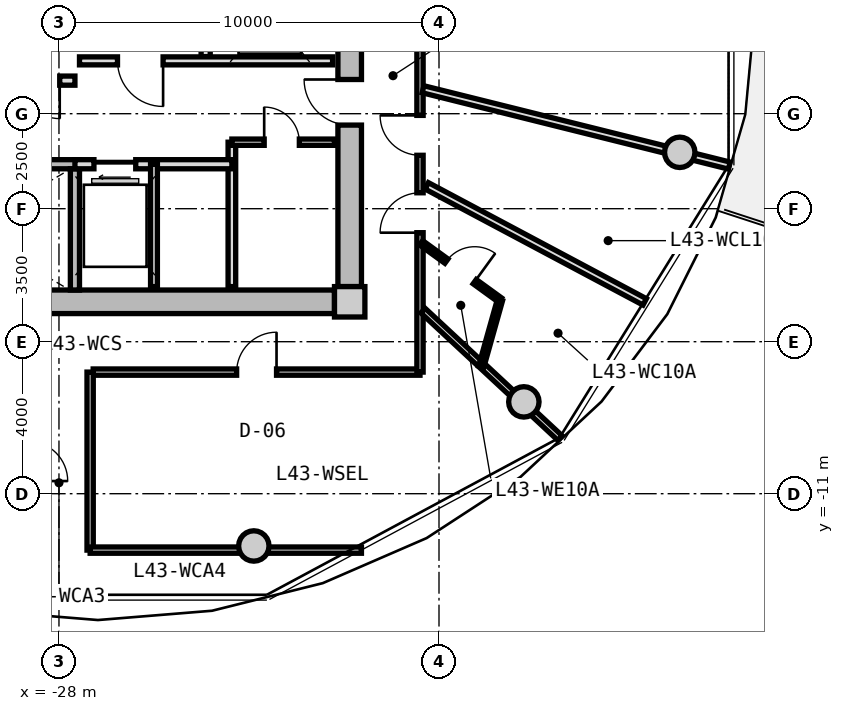
"""IFC4 building model, lengths in metres.
Left out: names, types, materials, properties, quantities, classifications, styles, units other than length and angle.
Written with IfcOpenShell. Run it as: python <this file> out.ifc"""

import sys

from ifc_helpers import new_model, si_unit, direction, frame, frame_2d, origin, origin_2d, place, context, subcontext, project, spatial, rectangle, circle, extrude, source, transform, mapped, element, fill, save


model = new_model("IFC4")
c1 = context("Model", 3, precision=1e-05, world=origin(), true_north=direction((0.0, 1.0)))
c2 = subcontext(c1, "Body", "Model", "MODEL_VIEW")
j1 = project(units=[si_unit("LENGTHUNIT", "METRE"), si_unit("PLANEANGLEUNIT", "RADIAN")], contexts=[c1])
p1 = place(None, origin())
s1 = spatial("IfcSite", under=j1, at=p1, CompositionType="ELEMENT")
p2 = place(p1, origin())
s2 = spatial("IfcBuilding", under=s1, at=p2, CompositionType="ELEMENT")
p3 = place(p2, frame((0.0, 0.0, 140.4)))
s3 = spatial("IfcBuildingStorey", under=s2, at=p3, CompositionType="ELEMENT", Elevation=140.4)
m1 = source(origin(), c2, "Body", "SweptSolid", [
    extrude(rectangle(XDim=0.8, YDim=0.8, at=origin_2d()), origin(), (0.0, 0.0, 1.0), 3.05),
])
p4 = place(p3, frame((-20.35, -5.95, 0.0), z_axis=(0.0, 0.0, 1.0), x_axis=(1.0, 0.0, 0.0)))
e1 = element("IfcColumn", 1, at=p4, inside=s3, PredefinedType="COLUMN", context=c2, shape_type="MappedRepresentation", body=[
    mapped(m1, transform((0.0, 0.0, 0.0), x_axis=(1.0, 0.0, 0.0), y_axis=(0.0, 1.0, 0.0), z_axis=(0.0, 0.0, 1.0), scale=1.0)),
])
m2 = source(origin(), c2, "Body", "SweptSolid", [
    extrude(rectangle(XDim=14.5, YDim=0.62, at=frame_2d((7.25, 0.0))), origin(), (0.0, 0.0, 1.0), 2.81),
])
p5 = place(p3, frame((-20.75, -5.95, 0.0), z_axis=(0.0, 0.0, 1.0), x_axis=(-1.0, 0.0, 0.0)))
e2 = element("IfcWall", 2, at=p5, inside=s3, PredefinedType="SHEAR", context=c2, shape_type="MappedRepresentation", body=[
    mapped(m2, transform((0.0, 0.0, 0.0), x_axis=(1.0, 0.0, 0.0), y_axis=(0.0, 1.0, 0.0), z_axis=(0.0, 0.0, 1.0), scale=1.0)),
])
m3 = source(origin(), c2, "Body", "SweptSolid", [
    extrude(rectangle(XDim=11.1, YDim=0.62, at=frame_2d((5.55, 0.0))), origin(), (0.0, 0.0, 1.0), 2.81),
])
p6 = place(p3, frame((-20.35, 5.55, 0.0), z_axis=(0.0, 0.0, 1.0), x_axis=(0.0, -1.0, 0.0)))
e3 = element("IfcWall", 3, at=p6, inside=s3, PredefinedType="SHEAR", context=c2, shape_type="MappedRepresentation", body=[
    mapped(m3, transform((0.0, 0.0, 0.0), x_axis=(1.0, 0.0, 0.0), y_axis=(0.0, 1.0, 0.0), z_axis=(0.0, 0.0, 1.0), scale=1.0)),
])
p7 = place(p6, frame((5.65, 0.0, 0.0)))
e4 = element("IfcOpeningElement", 4, at=p7, cuts=e3, PredefinedType="OPENING", context=c2, shape_type="SweptSolid", body=[
    extrude(rectangle(XDim=1.2, YDim=2.15, at=frame_2d((0.6, 1.075))), frame((0.0, 0.32, 0.0), z_axis=(0.0, -1.0, 0.0), x_axis=(1.0, 0.0, 0.0)), (0.0, 0.0, 1.0), 0.64),
])
m4 = source(origin(), c2, "Body", "SweptSolid", [
    extrude(circle(Radius=0.4, at=origin_2d()), origin(), (0.0, 0.0, 1.0), 3.05),
])
for number, where, z_axis, x_axis in (
    (5, (-22.873, -12.375, 0.0), (0.0, 0.0, 1.0), (1.0, 0.0, 0.0)),
    (6, (-15.767, -8.584, 0.0), (0.0, 0.0, 1.0), (1.0, 0.0, 0.0)),
    (7, (-11.665, -2.016, 0.0), (0.0, 0.0, 1.0), (1.0, 0.0, 0.0)),
):
    element("IfcColumn", number, at=place(p3, frame(where, z_axis=z_axis, x_axis=x_axis)), inside=s3, PredefinedType="COLUMN", context=c2, shape_type="MappedRepresentation", body=[
        mapped(m4, transform((0.0, 0.0, 0.0), x_axis=(1.0, 0.0, 0.0), y_axis=(0.0, 1.0, 0.0), z_axis=(0.0, 0.0, 1.0), scale=1.0)),
    ])
m5 = source(origin(), c2, "Body", "SweptSolid", [
    extrude(rectangle(XDim=7.88, YDim=0.24, at=frame_2d((3.94, 0.0))), origin(), (0.0, 0.0, 1.0), 2.81),
])
p8 = place(p3, frame((-35.34, -2.33, 0.0), z_axis=(0.0, 0.0, 1.0), x_axis=(1.0, 0.0, 0.0)))
e8 = element("IfcWall", 8, at=p8, inside=s3, PredefinedType="PARTITIONING", context=c2, shape_type="MappedRepresentation", body=[
    mapped(m5, transform((0.0, 0.0, 0.0), x_axis=(1.0, 0.0, 0.0), y_axis=(0.0, 1.0, 0.0), z_axis=(0.0, 0.0, 1.0), scale=1.0)),
])
p9 = place(p8, frame((1.0, 0.0, 0.0)))
e9 = element("IfcOpeningElement", 9, at=p9, cuts=e8, PredefinedType="OPENING", context=c2, shape_type="SweptSolid", body=[
    extrude(rectangle(XDim=1.1, YDim=2.15, at=frame_2d((0.55, 1.075))), frame((0.0, 0.13, 0.0), z_axis=(0.0, -1.0, 0.0), x_axis=(1.0, 0.0, 0.0)), (0.0, 0.0, 1.0), 0.26),
])
m6 = source(origin(), c2, "Body", "SweptSolid", [
    extrude(rectangle(XDim=3.19, YDim=0.24, at=frame_2d((1.595, 0.0))), origin(), (0.0, 0.0, 1.0), 2.81),
])
p10 = place(p3, frame((-27.58, -5.64, 0.0), z_axis=(0.0, 0.0, 1.0), x_axis=(0.0, 1.0, 0.0)))
e10 = element("IfcWall", 10, at=p10, inside=s3, PredefinedType="PARTITIONING", context=c2, shape_type="MappedRepresentation", body=[
    mapped(m6, transform((0.0, 0.0, 0.0), x_axis=(1.0, 0.0, 0.0), y_axis=(0.0, 1.0, 0.0), z_axis=(0.0, 0.0, 1.0), scale=1.0)),
])
m7 = source(origin(), c2, "Body", "SweptSolid", [
    extrude(rectangle(XDim=5.0, YDim=0.24, at=frame_2d((2.5, 0.0))), origin(), (0.0, 0.0, 1.0), 2.795),
])
p11 = place(p3, frame((-24.14, 0.5, 0.0), z_axis=(0.0, 0.0, 1.0), x_axis=(0.0, 1.0, 0.0)))
e11 = element("IfcWall", 11, at=p11, inside=s3, PredefinedType="PARTITIONING", context=c2, shape_type="MappedRepresentation", body=[
    mapped(m7, transform((0.0, 0.0, 0.0), x_axis=(1.0, 0.0, 0.0), y_axis=(0.0, 1.0, 0.0), z_axis=(0.0, 0.0, 1.0), scale=1.0)),
])
p12 = place(p11, frame((3.05, 0.0, 0.0)))
e12 = element("IfcOpeningElement", 12, at=p12, cuts=e11, PredefinedType="OPENING", context=c2, shape_type="SweptSolid", body=[
    extrude(rectangle(XDim=1.3, YDim=2.2, at=frame_2d((0.65, 1.1))), frame((0.0, 0.13, 0.0), z_axis=(0.0, -1.0, 0.0), x_axis=(1.0, 0.0, 0.0)), (0.0, 0.0, 1.0), 0.26),
])
p13 = place(p11, frame((0.55, 0.0, 0.0)))
e13 = element("IfcOpeningElement", 13, at=p13, cuts=e11, PredefinedType="OPENING", context=c2, shape_type="SweptSolid", body=[
    extrude(rectangle(XDim=1.3, YDim=2.2, at=frame_2d((0.65, 1.1))), frame((0.0, 0.13, 0.0), z_axis=(0.0, -1.0, 0.0), x_axis=(1.0, 0.0, 0.0)), (0.0, 0.0, 1.0), 0.26),
])
m8 = source(origin(), c2, "Body", "SweptSolid", [
    extrude(rectangle(XDim=6.66, YDim=0.21, at=frame_2d((3.33, 0.0))), origin(), (0.0, 0.0, 1.0), 2.795),
])
p14 = place(p3, frame((-27.46, 0.39, 0.0), z_axis=(0.0, 0.0, 1.0), x_axis=(1.0, 0.0, 0.0)))
e14 = element("IfcWall", 14, at=p14, inside=s3, PredefinedType="PARTITIONING", context=c2, shape_type="MappedRepresentation", body=[
    mapped(m8, transform((0.0, 0.0, 0.0), x_axis=(1.0, 0.0, 0.0), y_axis=(0.0, 1.0, 0.0), z_axis=(0.0, 0.0, 1.0), scale=1.0)),
])
p15 = place(p14, frame((1.0, 0.0, 0.0)))
e15 = element("IfcOpeningElement", 15, at=p15, cuts=e14, PredefinedType="OPENING", context=c2, shape_type="SweptSolid", body=[
    extrude(rectangle(XDim=1.2, YDim=2.15, at=frame_2d((0.6, 1.075))), frame((0.0, 0.115, 0.0), z_axis=(0.0, -1.0, 0.0), x_axis=(1.0, 0.0, 0.0)), (0.0, 0.0, 1.0), 0.23),
])
m9 = source(origin(), c2, "Body", "SweptSolid", [
    extrude(rectangle(XDim=7.62, YDim=0.24, at=frame_2d((3.81, 0.0))), origin(), (0.0, 0.0, 1.0), 2.795),
])
p16 = place(p3, frame((-35.2, -0.13, 0.0), z_axis=(0.0, 0.0, 1.0), x_axis=(1.0, 0.0, 0.0)))
e16 = element("IfcWall", 16, at=p16, inside=s3, PredefinedType="PARTITIONING", context=c2, shape_type="MappedRepresentation", body=[
    mapped(m9, transform((0.0, 0.0, 0.0), x_axis=(1.0, 0.0, 0.0), y_axis=(0.0, 1.0, 0.0), z_axis=(0.0, 0.0, 1.0), scale=1.0)),
])
p17 = place(p16, frame((6.22, 0.0, 0.0)))
e17 = element("IfcOpeningElement", 17, at=p17, cuts=e16, PredefinedType="OPENING", context=c2, shape_type="SweptSolid", body=[
    extrude(rectangle(XDim=1.0, YDim=2.1, at=frame_2d((0.5, 1.05))), frame((0.0, 0.13, 0.0), z_axis=(0.0, -1.0, 0.0), x_axis=(1.0, 0.0, 0.0)), (0.0, 0.0, 1.0), 0.26),
])
p18 = place(p16, frame((2.4, 0.0, 0.0)))
e18 = element("IfcOpeningElement", 18, at=p18, cuts=e16, PredefinedType="OPENING", context=c2, shape_type="SweptSolid", body=[
    extrude(rectangle(XDim=1.0, YDim=2.1, at=frame_2d((0.5, 1.05))), frame((0.0, 0.13, 0.0), z_axis=(0.0, -1.0, 0.0), x_axis=(1.0, 0.0, 0.0)), (0.0, 0.0, 1.0), 0.26),
])
m10 = source(origin(), c2, "Body", "SweptSolid", [
    extrude(rectangle(XDim=3.8, YDim=0.2, at=frame_2d((1.9, 0.0))), origin(), (0.0, 0.0, 1.0), 2.795),
])
p19 = place(p3, frame((-23.45, -5.55, 0.0), z_axis=(0.0, 0.0, 1.0), x_axis=(0.0, 1.0, 0.0)))
e19 = element("IfcWall", 19, at=p19, inside=s3, PredefinedType="PARTITIONING", context=c2, shape_type="MappedRepresentation", body=[
    mapped(m10, transform((0.0, 0.0, 0.0), x_axis=(1.0, 0.0, 0.0), y_axis=(0.0, 1.0, 0.0), z_axis=(0.0, 0.0, 1.0), scale=1.0)),
])
m11 = source(origin(), c2, "Body", "SweptSolid", [
    extrude(rectangle(XDim=4.13, YDim=0.24, at=frame_2d((2.065, 0.0))), origin(), (0.0, 0.0, 1.0), 2.795),
])
p20 = place(p3, frame((-27.58, -2.33, 0.0), z_axis=(0.0, 0.0, 1.0), x_axis=(1.0, 0.0, 0.0)))
e20 = element("IfcWall", 20, at=p20, inside=s3, PredefinedType="PARTITIONING", context=c2, shape_type="MappedRepresentation", body=[
    mapped(m11, transform((0.0, 0.0, 0.0), x_axis=(1.0, 0.0, 0.0), y_axis=(0.0, 1.0, 0.0), z_axis=(0.0, 0.0, 1.0), scale=1.0)),
])
p21 = place(p20, frame((0.5, 0.0, 0.0)))
e21 = element("IfcOpeningElement", 21, at=p21, cuts=e20, PredefinedType="OPENING", context=c2, shape_type="SweptSolid", body=[
    extrude(rectangle(XDim=1.1, YDim=2.2, at=frame_2d((0.55, 1.1))), frame((0.0, 0.13, 0.0), z_axis=(0.0, -1.0, 0.0), x_axis=(1.0, 0.0, 0.0)), (0.0, 0.0, 1.0), 0.26),
])
m12 = source(origin(), c2, "Body", "SweptSolid", [
    extrude(rectangle(XDim=3.22, YDim=0.18, at=frame_2d((1.61, 0.0))), origin(), (0.0, 0.0, 1.0), 2.795),
])
p22 = place(p3, frame((-25.5, -5.55, 0.0), z_axis=(0.0, 0.0, 1.0), x_axis=(0.0, 1.0, 0.0)))
e22 = element("IfcWall", 22, at=p22, inside=s3, PredefinedType="PARTITIONING", context=c2, shape_type="MappedRepresentation", body=[
    mapped(m12, transform((0.0, 0.0, 0.0), x_axis=(1.0, 0.0, 0.0), y_axis=(0.0, 1.0, 0.0), z_axis=(0.0, 0.0, 1.0), scale=1.0)),
])
m13 = source(origin(), c2, "Body", "SweptSolid", [
    extrude(rectangle(XDim=2.7, YDim=0.165, at=frame_2d((1.35, 0.0))), origin(), (0.0, 0.0, 1.0), 2.795),
])
p23 = place(p3, frame((-23.45, -1.75, 0.0), z_axis=(0.0, 0.0, 1.0), x_axis=(1.0, 0.0, 0.0)))
e23 = element("IfcWall", 23, at=p23, inside=s3, PredefinedType="PARTITIONING", context=c2, shape_type="MappedRepresentation", body=[
    mapped(m13, transform((0.0, 0.0, 0.0), x_axis=(1.0, 0.0, 0.0), y_axis=(0.0, 1.0, 0.0), z_axis=(0.0, 0.0, 1.0), scale=1.0)),
])
p24 = place(p23, frame((0.85, 0.0, 0.0)))
e24 = element("IfcOpeningElement", 24, at=p24, cuts=e23, PredefinedType="OPENING", context=c2, shape_type="SweptSolid", body=[
    extrude(rectangle(XDim=0.925, YDim=2.1, at=frame_2d((0.462, 1.05))), frame((0.0, 0.093, 0.0), z_axis=(0.0, -1.0, 0.0), x_axis=(1.0, 0.0, 0.0)), (0.0, 0.0, 1.0), 0.185),
])
m14 = source(origin(), c2, "Body", "SweptSolid", [
    extrude(rectangle(XDim=8.6, YDim=0.165, at=frame_2d((4.3, 0.0))), origin(), (0.0, 0.0, 1.0), 2.795),
])
p25 = place(p3, frame((-18.5, -7.8, 0.0), z_axis=(0.0, 0.0, 1.0), x_axis=(-1.0, 0.0, 0.0)))
e25 = element("IfcWall", 25, at=p25, inside=s3, PredefinedType="PARTITIONING", context=c2, shape_type="MappedRepresentation", body=[
    mapped(m14, transform((0.0, 0.0, 0.0), x_axis=(1.0, 0.0, 0.0), y_axis=(0.0, 1.0, 0.0), z_axis=(0.0, 0.0, 1.0), scale=1.0)),
])
p26 = place(p25, frame((3.775, 0.0, 0.0)))
e26 = element("IfcOpeningElement", 26, at=p26, cuts=e25, PredefinedType="OPENING", context=c2, shape_type="SweptSolid", body=[
    extrude(rectangle(XDim=1.05, YDim=2.15, at=frame_2d((0.525, 1.075))), frame((0.0, 0.093, 0.0), z_axis=(0.0, -1.0, 0.0), x_axis=(1.0, 0.0, 0.0)), (0.0, 0.0, 1.0), 0.185),
])
m15 = source(origin(), c2, "Body", "SweptSolid", [
    extrude(rectangle(XDim=15.6, YDim=0.165, at=frame_2d((7.8, 0.0))), origin(), (0.0, 0.0, 1.0), 2.795),
])
p27 = place(p3, frame((-18.5, 7.8, 0.0), z_axis=(0.0, 0.0, 1.0), x_axis=(0.0, -1.0, 0.0)))
e27 = element("IfcWall", 27, at=p27, inside=s3, PredefinedType="PARTITIONING", context=c2, shape_type="MappedRepresentation", body=[
    mapped(m15, transform((0.0, 0.0, 0.0), x_axis=(1.0, 0.0, 0.0), y_axis=(0.0, 1.0, 0.0), z_axis=(0.0, 0.0, 1.0), scale=1.0)),
])
p28 = place(p27, frame((10.881, 0.0, 0.0)))
e28 = element("IfcOpeningElement", 28, at=p28, cuts=e27, PredefinedType="OPENING", context=c2, shape_type="SweptSolid", body=[
    extrude(rectangle(XDim=1.05, YDim=2.15, at=frame_2d((0.525, 1.075))), frame((0.0, 0.093, 0.0), z_axis=(0.0, -1.0, 0.0), x_axis=(1.0, 0.0, 0.0)), (0.0, 0.0, 1.0), 0.185),
])
p29 = place(p27, frame((8.844, 0.0, 0.0)))
e29 = element("IfcOpeningElement", 29, at=p29, cuts=e27, PredefinedType="OPENING", context=c2, shape_type="SweptSolid", body=[
    extrude(rectangle(XDim=1.05, YDim=2.15, at=frame_2d((0.525, 1.075))), frame((0.0, 0.093, 0.0), z_axis=(0.0, -1.0, 0.0), x_axis=(1.0, 0.0, 0.0)), (0.0, 0.0, 1.0), 0.185),
])
p30 = place(p27, frame((3.596, 0.0, 0.0)))
e30 = element("IfcOpeningElement", 30, at=p30, cuts=e27, PredefinedType="OPENING", context=c2, shape_type="SweptSolid", body=[
    extrude(rectangle(XDim=1.25, YDim=2.2, at=frame_2d((0.625, 1.1))), frame((0.0, 0.093, 0.0), z_axis=(0.0, -1.0, 0.0), x_axis=(1.0, 0.0, 0.0)), (0.0, 0.0, 1.0), 0.185),
])
m16 = source(origin(), c2, "Body", "SweptSolid", [
    extrude(rectangle(XDim=4.927, YDim=0.165, at=frame_2d((2.463, 0.0))), origin(), (0.0, 0.0, 1.0), 2.345),
])
p31 = place(p3, frame((-18.42, -6.183, 0.0), z_axis=(0.0, 0.0, 1.0), x_axis=(0.732191335987, -0.681098999783, 0.0)))
e31 = element("IfcWall", 31, at=p31, inside=s3, PredefinedType="PARTITIONING", context=c2, shape_type="MappedRepresentation", body=[
    mapped(m16, transform((0.0, 0.0, 0.0), x_axis=(1.0, 0.0, 0.0), y_axis=(0.0, 1.0, 0.0), z_axis=(0.0, 0.0, 1.0), scale=1.0)),
])
m17 = source(origin(), c2, "Body", "SweptSolid", [
    extrude(rectangle(XDim=4.685, YDim=0.165, at=frame_2d((2.342, 0.0))), origin(), (0.0, 0.0, 1.0), 2.795),
])
p32 = place(p3, frame((-27.18, -12.485, 0.0), z_axis=(0.0, 0.0, 1.0), x_axis=(0.0, 1.0, 0.0)))
e32 = element("IfcWall", 32, at=p32, inside=s3, PredefinedType="PARTITIONING", context=c2, shape_type="MappedRepresentation", body=[
    mapped(m17, transform((0.0, 0.0, 0.0), x_axis=(1.0, 0.0, 0.0), y_axis=(0.0, 1.0, 0.0), z_axis=(0.0, 0.0, 1.0), scale=1.0)),
])
m18 = source(origin(), c2, "Body", "SweptSolid", [
    extrude(rectangle(XDim=7.139, YDim=0.165, at=frame_2d((3.569, 0.0))), origin(), (0.0, 0.0, 1.0), 2.345),
])
p33 = place(p3, frame((-27.18, -12.485, 0.0), z_axis=(0.0, 0.0, 1.0), x_axis=(1.0, 0.0, 0.0)))
e33 = element("IfcWall", 33, at=p33, inside=s3, PredefinedType="PARTITIONING", context=c2, shape_type="MappedRepresentation", body=[
    mapped(m18, transform((0.0, 0.0, 0.0), x_axis=(1.0, 0.0, 0.0), y_axis=(0.0, 1.0, 0.0), z_axis=(0.0, 0.0, 1.0), scale=1.0)),
])
m19 = source(origin(), c2, "Body", "SweptSolid", [
    extrude(rectangle(XDim=8.305, YDim=0.19, at=frame_2d((4.153, 0.0))), origin(), (0.0, 0.0, 1.0), 2.345),
])
p34 = place(p3, frame((-18.42, -0.357, 0.0), z_axis=(0.0, 0.0, 1.0), x_axis=(0.970309994378, -0.241864662175, 0.0)))
e34 = element("IfcWall", 34, at=p34, inside=s3, PredefinedType="PARTITIONING", context=c2, shape_type="MappedRepresentation", body=[
    mapped(m19, transform((0.0, 0.0, 0.0), x_axis=(1.0, 0.0, 0.0), y_axis=(0.0, 1.0, 0.0), z_axis=(0.0, 0.0, 1.0), scale=1.0)),
])
m20 = source(origin(), c2, "Body", "SweptSolid", [
    extrude(rectangle(XDim=6.499, YDim=0.19, at=frame_2d((3.25, 0.0))), origin(), (0.0, 0.0, 1.0), 2.795),
])
p35 = place(p3, frame((-18.324, -2.898, 0.0), z_axis=(0.0, 0.0, 1.0), x_axis=(0.882700013711, -0.469936895545, 0.0)))
e35 = element("IfcWall", 35, at=p35, inside=s3, PredefinedType="PARTITIONING", context=c2, shape_type="MappedRepresentation", body=[
    mapped(m20, transform((0.0, 0.0, 0.0), x_axis=(1.0, 0.0, 0.0), y_axis=(0.0, 1.0, 0.0), z_axis=(0.0, 0.0, 1.0), scale=1.0)),
])
m21 = source(origin(), c2, "Body", "SweptSolid", [
    extrude(rectangle(XDim=2.563, YDim=0.14, at=frame_2d((1.282, 0.0))), origin(), (0.0, 0.0, 1.0), 2.795),
])
p36 = place(p3, frame((-18.47, -4.397, 0.0), z_axis=(0.0, 0.0, 1.0), x_axis=(0.809308208957, -0.587384220859, 0.0)))
e36 = element("IfcWall", 36, at=p36, inside=s3, PredefinedType="PARTITIONING", context=c2, shape_type="MappedRepresentation", body=[
    mapped(m21, transform((0.0, 0.0, 0.0), x_axis=(1.0, 0.0, 0.0), y_axis=(0.0, 1.0, 0.0), z_axis=(0.0, 0.0, 1.0), scale=1.0)),
])
p37 = place(p36, frame((0.822, 0.0, 0.0)))
e37 = element("IfcOpeningElement", 37, at=p37, cuts=e36, PredefinedType="OPENING", context=c2, shape_type="SweptSolid", body=[
    extrude(rectangle(XDim=0.92, YDim=2.1, at=frame_2d((0.46, 1.05))), frame((0.0, 0.08, 0.0), z_axis=(0.0, -1.0, 0.0), x_axis=(1.0, 0.0, 0.0)), (0.0, 0.0, 1.0), 0.16),
])
m22 = source(origin(), c2, "Body", "SweptSolid", [
    extrude(rectangle(XDim=1.826, YDim=0.14, at=frame_2d((0.913, 0.0))), origin(), (0.0, 0.0, 1.0), 2.435),
])
p38 = place(p3, frame((-16.396, -5.903, 0.0), z_axis=(0.0, 0.0, 1.0), x_axis=(-0.270745576918, -0.962650940154, 0.0)))
e38 = element("IfcWall", 38, at=p38, inside=s3, PredefinedType="PARTITIONING", context=c2, shape_type="MappedRepresentation", body=[
    mapped(m22, transform((0.0, 0.0, 0.0), x_axis=(1.0, 0.0, 0.0), y_axis=(0.0, 1.0, 0.0), z_axis=(0.0, 0.0, 1.0), scale=1.0)),
])
m23 = source(origin(), c2, "Body", "SweptSolid", [
    extrude(rectangle(XDim=1.2, YDim=2.15, at=frame_2d((0.6, 1.075))), frame((0.0, 0.025, 0.0), z_axis=(0.0, -1.0, 0.0), x_axis=(1.0, 0.0, 0.0)), (0.0, 0.0, 1.0), 0.05),
])
p39 = place(p15, frame((1.2, 0.0, 0.0), z_axis=(0.0, 0.0, 1.0), x_axis=(-1.0, 0.0, 0.0)))
e39 = element("IfcDoor", 39, at=p39, inside=s3, OperationType="SINGLE_SWING_LEFT", PredefinedType="DOOR", context=c2, shape_type="MappedRepresentation", body=[
    mapped(m23, transform((0.0, 0.0, 0.0), x_axis=(1.0, 0.0, 0.0), y_axis=(0.0, 1.0, 0.0), z_axis=(0.0, 0.0, 1.0), scale=1.0)),
])
fill(e15, e39)
p40 = place(p7, frame((1.2, 0.0, 0.0), z_axis=(0.0, 0.0, 1.0), x_axis=(-1.0, 0.0, 0.0)))
e40 = element("IfcDoor", 40, at=p40, inside=s3, OperationType="SINGLE_SWING_RIGHT", PredefinedType="DOOR", context=c2, shape_type="MappedRepresentation", body=[
    mapped(m23, transform((0.0, 0.0, 0.0), x_axis=(1.0, 0.0, 0.0), y_axis=(0.0, 1.0, 0.0), z_axis=(0.0, 0.0, 1.0), scale=1.0)),
])
fill(e4, e40)
m24 = source(origin(), c2, "Body", "SweptSolid", [
    extrude(rectangle(XDim=1.0, YDim=2.1, at=frame_2d((0.5, 1.05))), frame((0.0, 0.025, 0.0), z_axis=(0.0, -1.0, 0.0), x_axis=(1.0, 0.0, 0.0)), (0.0, 0.0, 1.0), 0.05),
])
p41 = place(p17, frame((1.0, 0.0, 0.0), z_axis=(0.0, 0.0, 1.0), x_axis=(-1.0, 0.0, 0.0)))
e41 = element("IfcDoor", 41, at=p41, inside=s3, OperationType="SINGLE_SWING_LEFT", PredefinedType="DOOR", context=c2, shape_type="MappedRepresentation", body=[
    mapped(m24, transform((0.0, 0.0, 0.0), x_axis=(1.0, 0.0, 0.0), y_axis=(0.0, 1.0, 0.0), z_axis=(0.0, 0.0, 1.0), scale=1.0)),
])
fill(e17, e41)
m25 = source(origin(), c2, "Body", "SweptSolid", [
    extrude(rectangle(XDim=1.1, YDim=2.2, at=frame_2d((0.55, 1.1))), frame((0.0, 0.025, 0.0), z_axis=(0.0, -1.0, 0.0), x_axis=(1.0, 0.0, 0.0)), (0.0, 0.0, 1.0), 0.05),
])
p42 = place(p21, frame((1.1, 0.0, 0.0), z_axis=(0.0, 0.0, 1.0), x_axis=(-1.0, 0.0, 0.0)))
e42 = element("IfcDoor", 42, at=p42, inside=s3, OperationType="SLIDING_TO_LEFT", PredefinedType="DOOR", context=c2, shape_type="MappedRepresentation", body=[
    mapped(m25, transform((0.0, 0.0, 0.0), x_axis=(1.0, 0.0, 0.0), y_axis=(0.0, 1.0, 0.0), z_axis=(0.0, 0.0, 1.0), scale=1.0)),
])
fill(e21, e42)
m26 = source(origin(), c2, "Body", "SweptSolid", [
    extrude(rectangle(XDim=0.925, YDim=2.1, at=frame_2d((0.462, 1.05))), frame((0.0, 0.025, 0.0), z_axis=(0.0, -1.0, 0.0), x_axis=(1.0, 0.0, 0.0)), (0.0, 0.0, 1.0), 0.05),
])
p43 = place(p24, origin())
e43 = element("IfcDoor", 43, at=p43, inside=s3, OperationType="SINGLE_SWING_LEFT", PredefinedType="DOOR", context=c2, shape_type="MappedRepresentation", body=[
    mapped(m26, transform((0.0, 0.0, 0.0), x_axis=(1.0, 0.0, 0.0), y_axis=(0.0, 1.0, 0.0), z_axis=(0.0, 0.0, 1.0), scale=1.0)),
])
fill(e24, e43)
m27 = source(origin(), c2, "Body", "SweptSolid", [
    extrude(rectangle(XDim=1.05, YDim=2.15, at=frame_2d((0.525, 1.075))), frame((0.0, 0.025, 0.0), z_axis=(0.0, -1.0, 0.0), x_axis=(1.0, 0.0, 0.0)), (0.0, 0.0, 1.0), 0.05),
])
p44 = place(p26, frame((1.05, 0.0, 0.0), z_axis=(0.0, 0.0, 1.0), x_axis=(-1.0, 0.0, 0.0)))
e44 = element("IfcDoor", 44, at=p44, inside=s3, OperationType="SINGLE_SWING_RIGHT", PredefinedType="DOOR", context=c2, shape_type="MappedRepresentation", body=[
    mapped(m27, transform((0.0, 0.0, 0.0), x_axis=(1.0, 0.0, 0.0), y_axis=(0.0, 1.0, 0.0), z_axis=(0.0, 0.0, 1.0), scale=1.0)),
])
fill(e26, e44)
p45 = place(p28, frame((1.05, 0.0, 0.0), z_axis=(0.0, 0.0, 1.0), x_axis=(-1.0, 0.0, 0.0)))
e45 = element("IfcDoor", 45, at=p45, inside=s3, OperationType="SINGLE_SWING_LEFT", PredefinedType="DOOR", context=c2, shape_type="MappedRepresentation", body=[
    mapped(m27, transform((0.0, 0.0, 0.0), x_axis=(1.0, 0.0, 0.0), y_axis=(0.0, 1.0, 0.0), z_axis=(0.0, 0.0, 1.0), scale=1.0)),
])
fill(e28, e45)
m28 = source(origin(), c2, "Body", "SweptSolid", [
    extrude(rectangle(XDim=0.92, YDim=2.1, at=frame_2d((0.46, 1.05))), frame((0.0, 0.025, 0.0), z_axis=(0.0, -1.0, 0.0), x_axis=(1.0, 0.0, 0.0)), (0.0, 0.0, 1.0), 0.05),
])
p46 = place(p37, origin())
e46 = element("IfcDoor", 46, at=p46, inside=s3, OperationType="SINGLE_SWING_RIGHT", PredefinedType="DOOR", context=c2, shape_type="MappedRepresentation", body=[
    mapped(m28, transform((0.0, 0.0, 0.0), x_axis=(1.0, 0.0, 0.0), y_axis=(0.0, 1.0, 0.0), z_axis=(0.0, 0.0, 1.0), scale=1.0)),
])
fill(e37, e46)
p47 = place(p29, frame((1.05, 0.0, 0.0), z_axis=(0.0, 0.0, 1.0), x_axis=(-1.0, 0.0, 0.0)))
e47 = element("IfcDoor", 47, at=p47, inside=s3, OperationType="SINGLE_SWING_RIGHT", PredefinedType="DOOR", context=c2, shape_type="MappedRepresentation", body=[
    mapped(m27, transform((0.0, 0.0, 0.0), x_axis=(1.0, 0.0, 0.0), y_axis=(0.0, 1.0, 0.0), z_axis=(0.0, 0.0, 1.0), scale=1.0)),
])
fill(e29, e47)
save(model, sys.argv[1])
